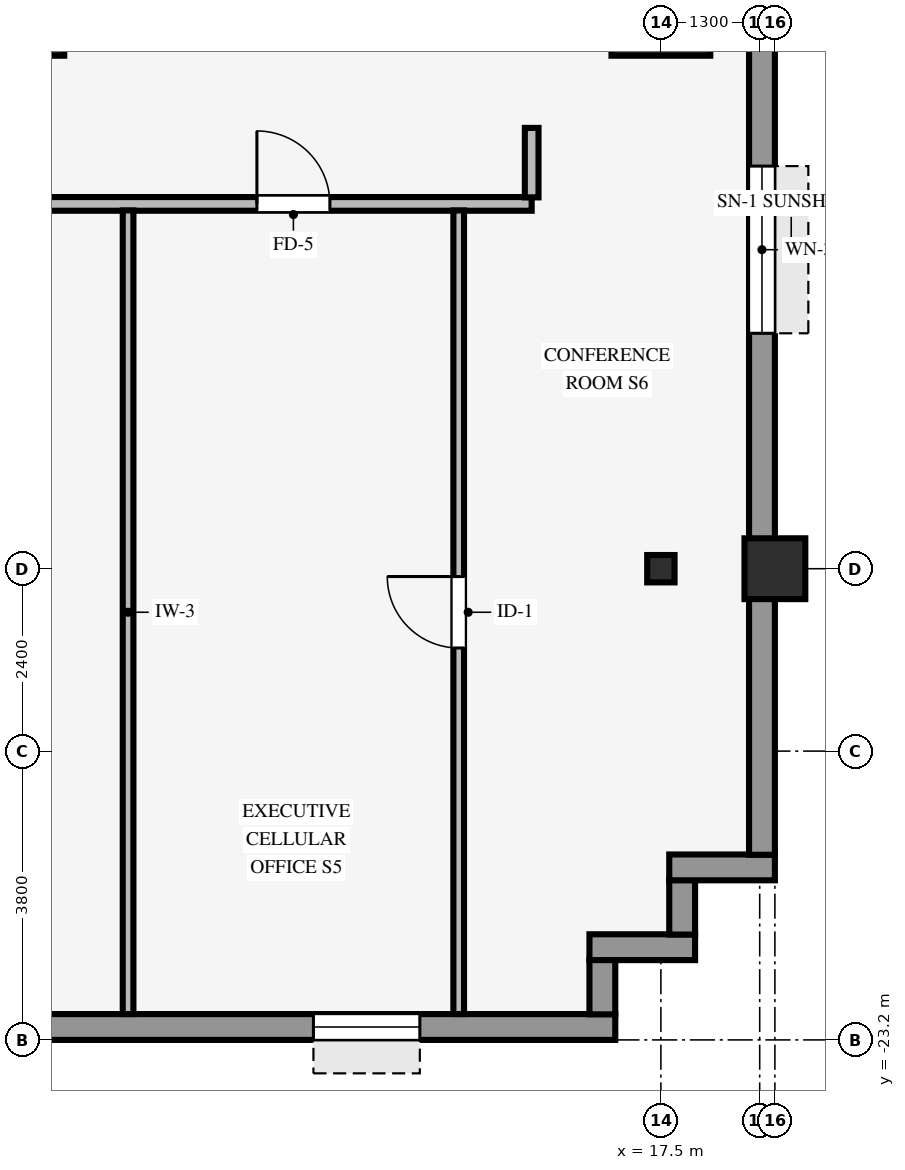
"""IFC4 building model, lengths in metres.
Left out: names, types, materials, properties, quantities, classifications, styles, units other than length and angle.
Written with IfcOpenShell. Run it as: python <this file> out.ifc"""

import sys

from ifc_helpers import new_model, si_unit, direction, frame, frame_2d, origin, origin_2d, place, context, subcontext, project, spatial, rectangle, hollow_rectangle, i_section, extrude, source, transform, mapped, element, fill, save


model = new_model("IFC4")
c1 = context("Model", 3, precision=1e-05, world=origin(), true_north=direction((0.0, 1.0)))
c2 = subcontext(c1, "Body", "Model", "MODEL_VIEW")
j1 = project(units=[si_unit("LENGTHUNIT", "METRE"), si_unit("PLANEANGLEUNIT", "RADIAN")], contexts=[c1])
p1 = place(None, origin())
s1 = spatial("IfcSite", under=j1, at=p1, CompositionType="ELEMENT")
p2 = place(p1, origin())
s2 = spatial("IfcBuilding", under=s1, at=p2, CompositionType="ELEMENT")
p3 = place(p2, frame((0.0, 0.0, 53.15)))
s3 = spatial("IfcBuildingStorey", under=s2, at=p3, CompositionType="ELEMENT", Elevation=53.15)
for number, where, z_axis, x_axis in (
    (1, (9.0, -9.6, 0.0), (0.0, 0.0, 1.0), (1.0, 0.0, 0.0)),
    (2, (17.5, -9.6, 0.0), (0.0, 0.0, 1.0), (1.0, 0.0, 0.0)),
):
    element("IfcColumn", number, at=place(p3, frame(where, z_axis=z_axis, x_axis=x_axis)), inside=s3, PredefinedType="COLUMN", context=c2, shape_type="SweptSolid", body=[
        extrude(rectangle(XDim=1.3, YDim=1.3, at=origin_2d()), origin(), (0.0, 0.0, 1.0), 3.25),
    ])
p4 = place(p3, frame((19.0, -17.0, 0.0), z_axis=(0.0, 0.0, 1.0), x_axis=(1.0, 0.0, 0.0)))
e3 = element("IfcColumn", 3, at=p4, inside=s3, PredefinedType="COLUMN", context=c2, shape_type="SweptSolid", body=[
    extrude(hollow_rectangle(XDim=0.8, YDim=0.8, WallThickness=0.055, InnerFilletRadius=0.055, OuterFilletRadius=0.11, at=origin_2d()), origin(), (0.0, 0.0, 1.0), 3.25),
])
p5 = place(p3, frame((17.5, -17.0, 0.0), z_axis=(0.0, 0.0, 1.0), x_axis=(1.0, 0.0, 0.0)))
e4 = element("IfcColumn", 4, at=p5, inside=s3, PredefinedType="COLUMN", context=c2, shape_type="SweptSolid", body=[
    extrude(i_section(OverallWidth=0.36, OverallDepth=0.36, WebThickness=0.021, FlangeThickness=0.021, FilletRadius=0.018, at=origin_2d()), origin(), (0.0, 0.0, 1.0), 3.25),
])
p6 = place(p3, frame((-16.9, -23.03, 0.0), z_axis=(0.0, 0.0, 1.0), x_axis=(1.0, 0.0, 0.0)))
e5 = element("IfcWall", 5, at=p6, inside=s3, PredefinedType="STANDARD", context=c2, shape_type="SweptSolid", body=[
    extrude(rectangle(XDim=33.8, YDim=0.34, at=frame_2d((16.9, 0.0))), origin(), (0.0, 0.0, 1.0), 2.585),
])
p7 = place(p6, frame((2.121, 0.0, 0.8)))
e6 = element("IfcOpeningElement", 6, at=p7, cuts=e5, PredefinedType="OPENING", context=c2, shape_type="SweptSolid", body=[
    extrude(rectangle(XDim=1.4, YDim=1.65, at=frame_2d((0.7, 0.825))), frame((0.0, 0.18, 0.0), z_axis=(0.0, -1.0, 0.0), x_axis=(1.0, 0.0, 0.0)), (0.0, 0.0, 1.0), 0.36),
])
p8 = place(p6, frame((5.764, 0.0, 0.8)))
e7 = element("IfcOpeningElement", 7, at=p8, cuts=e5, PredefinedType="OPENING", context=c2, shape_type="SweptSolid", body=[
    extrude(rectangle(XDim=1.4, YDim=1.65, at=frame_2d((0.7, 0.825))), frame((0.0, 0.18, 0.0), z_axis=(0.0, -1.0, 0.0), x_axis=(1.0, 0.0, 0.0)), (0.0, 0.0, 1.0), 0.36),
])
p9 = place(p6, frame((11.657, 0.0, 0.8)))
e8 = element("IfcOpeningElement", 8, at=p9, cuts=e5, PredefinedType="OPENING", context=c2, shape_type="SweptSolid", body=[
    extrude(rectangle(XDim=1.4, YDim=1.65, at=frame_2d((0.7, 0.825))), frame((0.0, 0.18, 0.0), z_axis=(0.0, -1.0, 0.0), x_axis=(1.0, 0.0, 0.0)), (0.0, 0.0, 1.0), 0.36),
])
p10 = place(p6, frame((20.743, 0.0, 0.8)))
e9 = element("IfcOpeningElement", 9, at=p10, cuts=e5, PredefinedType="OPENING", context=c2, shape_type="SweptSolid", body=[
    extrude(rectangle(XDim=1.4, YDim=1.65, at=frame_2d((0.7, 0.825))), frame((0.0, 0.18, 0.0), z_axis=(0.0, -1.0, 0.0), x_axis=(1.0, 0.0, 0.0)), (0.0, 0.0, 1.0), 0.36),
])
p11 = place(p6, frame((29.829, 0.0, 0.8)))
e10 = element("IfcOpeningElement", 10, at=p11, cuts=e5, PredefinedType="OPENING", context=c2, shape_type="SweptSolid", body=[
    extrude(rectangle(XDim=1.4, YDim=1.65, at=frame_2d((0.7, 0.825))), frame((0.0, 0.18, 0.0), z_axis=(0.0, -1.0, 0.0), x_axis=(1.0, 0.0, 0.0)), (0.0, 0.0, 1.0), 0.36),
])
p12 = place(p3, frame((16.73, -22.864, 0.0), z_axis=(0.0, 0.0, 1.0), x_axis=(0.0, 1.0, 0.0)))
e11 = element("IfcWall", 11, at=p12, inside=s3, PredefinedType="STANDARD", context=c2, shape_type="SweptSolid", body=[
    extrude(rectangle(XDim=0.718, YDim=0.34, at=frame_2d((0.359, 0.0))), origin(), (0.0, 0.0, 1.0), 3.24),
])
p13 = place(p3, frame((16.56, -21.98, 0.0), z_axis=(0.0, 0.0, 1.0), x_axis=(1.0, 0.0, 0.0)))
e12 = element("IfcWall", 12, at=p13, inside=s3, PredefinedType="STANDARD", context=c2, shape_type="SweptSolid", body=[
    extrude(rectangle(XDim=1.39, YDim=0.34, at=frame_2d((0.695, 0.0))), origin(), (0.0, 0.0, 1.0), 3.24),
])
p14 = place(p3, frame((17.78, -21.814, 0.0), z_axis=(0.0, 0.0, 1.0), x_axis=(0.0, 1.0, 0.0)))
e13 = element("IfcWall", 13, at=p14, inside=s3, PredefinedType="STANDARD", context=c2, shape_type="SweptSolid", body=[
    extrude(rectangle(XDim=0.718, YDim=0.34, at=frame_2d((0.359, 0.0))), origin(), (0.0, 0.0, 1.0), 3.24),
])
p15 = place(p3, frame((17.61, -20.93, 0.0), z_axis=(0.0, 0.0, 1.0), x_axis=(1.0, 0.0, 0.0)))
e14 = element("IfcWall", 14, at=p15, inside=s3, PredefinedType="STANDARD", context=c2, shape_type="SweptSolid", body=[
    extrude(rectangle(XDim=1.39, YDim=0.34, at=frame_2d((0.695, 0.0))), origin(), (0.0, 0.0, 1.0), 3.24),
])
p16 = place(p3, frame((18.83, -20.764, 0.0), z_axis=(0.0, 0.0, 1.0), x_axis=(0.0, 1.0, 0.0)))
e15 = element("IfcWall", 15, at=p16, inside=s3, PredefinedType="STANDARD", context=c2, shape_type="SweptSolid", body=[
    extrude(rectangle(XDim=41.528, YDim=0.34, at=frame_2d((20.764, 0.0))), origin(), (0.0, 0.0, 1.0), 3.24),
])
p17 = place(p16, frame((6.862, 0.0, 0.8)))
e16 = element("IfcOpeningElement", 16, at=p17, cuts=e15, PredefinedType="OPENING", context=c2, shape_type="SweptSolid", body=[
    extrude(rectangle(XDim=2.2, YDim=1.65, at=frame_2d((1.1, 0.825))), frame((0.0, 0.18, 0.0), z_axis=(0.0, -1.0, 0.0), x_axis=(1.0, 0.0, 0.0)), (0.0, 0.0, 1.0), 0.36),
])
p18 = place(p16, frame((32.467, 0.0, 0.8)))
e17 = element("IfcOpeningElement", 17, at=p18, cuts=e15, PredefinedType="OPENING", context=c2, shape_type="SweptSolid", body=[
    extrude(rectangle(XDim=2.2, YDim=1.65, at=frame_2d((1.1, 0.825))), frame((0.0, 0.18, 0.0), z_axis=(0.0, -1.0, 0.0), x_axis=(1.0, 0.0, 0.0)), (0.0, 0.0, 1.0), 0.36),
])
p19 = place(p3, frame((-15.8, -12.2, 0.0), z_axis=(0.0, 0.0, 1.0), x_axis=(1.0, 0.0, 0.0)))
e18 = element("IfcWall", 18, at=p19, inside=s3, PredefinedType="PARTITIONING", context=c2, shape_type="SweptSolid", body=[
    extrude(rectangle(XDim=31.6, YDim=0.18, at=frame_2d((15.8, 0.0))), origin(), (0.0, 0.0, 1.0), 3.24),
])
p20 = place(p19, frame((18.085, 0.0, 0.0)))
e19 = element("IfcOpeningElement", 19, at=p20, cuts=e18, PredefinedType="OPENING", context=c2, shape_type="SweptSolid", body=[
    extrude(rectangle(XDim=0.96, YDim=2.1, at=frame_2d((0.48, 1.05))), frame((0.0, 0.1, 0.0), z_axis=(0.0, -1.0, 0.0), x_axis=(1.0, 0.0, 0.0)), (0.0, 0.0, 1.0), 0.2),
])
p21 = place(p19, frame((27.985, 0.0, 0.0)))
e20 = element("IfcOpeningElement", 20, at=p21, cuts=e18, PredefinedType="OPENING", context=c2, shape_type="SweptSolid", body=[
    extrude(rectangle(XDim=0.96, YDim=2.1, at=frame_2d((0.48, 1.05))), frame((0.0, 0.1, 0.0), z_axis=(0.0, -1.0, 0.0), x_axis=(1.0, 0.0, 0.0)), (0.0, 0.0, 1.0), 0.2),
])
p22 = place(p19, frame((23.73, 0.0, 0.0)))
e21 = element("IfcOpeningElement", 21, at=p22, cuts=e18, PredefinedType="OPENING", context=c2, shape_type="SweptSolid", body=[
    extrude(rectangle(XDim=0.96, YDim=2.1, at=frame_2d((0.48, 1.05))), frame((0.0, 0.1, 0.0), z_axis=(0.0, -1.0, 0.0), x_axis=(1.0, 0.0, 0.0)), (0.0, 0.0, 1.0), 0.2),
])
p23 = place(p19, frame((0.92, 0.0, 0.0)))
e22 = element("IfcOpeningElement", 22, at=p23, cuts=e18, PredefinedType="OPENING", context=c2, shape_type="SweptSolid", body=[
    extrude(rectangle(XDim=0.96, YDim=2.1, at=frame_2d((0.48, 1.05))), frame((0.0, 0.1, 0.0), z_axis=(0.0, -1.0, 0.0), x_axis=(1.0, 0.0, 0.0)), (0.0, 0.0, 1.0), 0.2),
])
p24 = place(p19, frame((6.25, 0.0, 0.0)))
e23 = element("IfcOpeningElement", 23, at=p24, cuts=e18, PredefinedType="OPENING", context=c2, shape_type="SweptSolid", body=[
    extrude(rectangle(XDim=0.9, YDim=2.1, at=frame_2d((0.45, 1.05))), frame((0.0, 0.1, 0.0), z_axis=(0.0, -1.0, 0.0), x_axis=(1.0, 0.0, 0.0)), (0.0, 0.0, 1.0), 0.2),
])
p25 = place(p19, frame((3.65, 0.0, 0.0)))
e24 = element("IfcOpeningElement", 24, at=p25, cuts=e18, PredefinedType="OPENING", context=c2, shape_type="SweptSolid", body=[
    extrude(rectangle(XDim=0.9, YDim=2.1, at=frame_2d((0.45, 1.05))), frame((0.0, 0.1, 0.0), z_axis=(0.0, -1.0, 0.0), x_axis=(1.0, 0.0, 0.0)), (0.0, 0.0, 1.0), 0.2),
])
p26 = place(p19, frame((13.32, 0.0, 0.0)))
e25 = element("IfcOpeningElement", 25, at=p26, cuts=e18, PredefinedType="OPENING", context=c2, shape_type="SweptSolid", body=[
    extrude(rectangle(XDim=0.96, YDim=2.1, at=frame_2d((0.48, 1.05))), frame((0.0, 0.1, 0.0), z_axis=(0.0, -1.0, 0.0), x_axis=(1.0, 0.0, 0.0)), (0.0, 0.0, 1.0), 0.2),
])
p27 = place(p19, frame((8.75, 0.0, 0.0)))
e26 = element("IfcOpeningElement", 26, at=p27, cuts=e18, PredefinedType="OPENING", context=c2, shape_type="SweptSolid", body=[
    extrude(rectangle(XDim=0.9, YDim=2.1, at=frame_2d((0.45, 1.05))), frame((0.0, 0.1, 0.0), z_axis=(0.0, -1.0, 0.0), x_axis=(1.0, 0.0, 0.0)), (0.0, 0.0, 1.0), 0.2),
])
p28 = place(p3, frame((10.49, -22.86, 0.0), z_axis=(0.0, 0.0, 1.0), x_axis=(0.0, 1.0, 0.0)))
e27 = element("IfcWall", 27, at=p28, inside=s3, PredefinedType="PARTITIONING", context=c2, shape_type="SweptSolid", body=[
    extrude(rectangle(XDim=10.574, YDim=0.14, at=frame_2d((5.287, 0.0))), origin(), (0.0, 0.0, 1.0), 3.24),
])
p29 = place(p3, frame((14.84, -22.86, 0.0), z_axis=(0.0, 0.0, 1.0), x_axis=(0.0, 1.0, 0.0)))
e28 = element("IfcWall", 28, at=p29, inside=s3, PredefinedType="PARTITIONING", context=c2, shape_type="SweptSolid", body=[
    extrude(rectangle(XDim=10.574, YDim=0.14, at=frame_2d((5.287, 0.0))), origin(), (0.0, 0.0, 1.0), 3.24),
])
p30 = place(p29, frame((4.817, 0.0, 0.0)))
e29 = element("IfcOpeningElement", 29, at=p30, cuts=e28, PredefinedType="OPENING", context=c2, shape_type="SweptSolid", body=[
    extrude(rectangle(XDim=0.94, YDim=2.1, at=frame_2d((0.47, 1.05))), frame((0.0, 0.08, 0.0), z_axis=(0.0, -1.0, 0.0), x_axis=(1.0, 0.0, 0.0)), (0.0, 0.0, 1.0), 0.16),
])
p31 = place(p3, frame((15.8, -12.114, 0.0), z_axis=(0.0, 0.0, 1.0), x_axis=(0.0, 1.0, 0.0)))
e30 = element("IfcWall", 30, at=p31, inside=s3, PredefinedType="PARTITIONING", context=c2, shape_type="SweptSolid", body=[
    extrude(rectangle(XDim=0.914, YDim=0.18, at=frame_2d((0.457, 0.0))), origin(), (0.0, 0.0, 1.0), 3.24),
])
m1 = source(origin(), c2, "Body", "SweptSolid", [
    extrude(rectangle(XDim=1.4, YDim=1.65, at=frame_2d((0.7, 0.825))), frame((0.0, 0.03, 0.0), z_axis=(0.0, -1.0, 0.0), x_axis=(1.0, 0.0, 0.0)), (0.0, 0.0, 1.0), 0.06),
])
p32 = place(p11, origin())
e31 = element("IfcWindow", 31, at=p32, inside=s3, PartitioningType="SINGLE_PANEL", PredefinedType="WINDOW", context=c2, shape_type="MappedRepresentation", body=[
    mapped(m1, transform((0.0, 0.0, 0.0), scale=1.0)),
])
fill(e10, e31)
m2 = source(origin(), c2, "Body", "SweptSolid", [
    extrude(rectangle(XDim=2.2, YDim=1.65, at=frame_2d((1.1, 0.825))), frame((0.0, 0.03, 0.0), z_axis=(0.0, -1.0, 0.0), x_axis=(1.0, 0.0, 0.0)), (0.0, 0.0, 1.0), 0.06),
])
p33 = place(p17, origin())
e32 = element("IfcWindow", 32, at=p33, inside=s3, PartitioningType="SINGLE_PANEL", PredefinedType="WINDOW", context=c2, shape_type="MappedRepresentation", body=[
    mapped(m2, transform((0.0, 0.0, 0.0), scale=1.0)),
])
fill(e16, e32)
m3 = source(origin(), c2, "Body", "SweptSolid", [
    extrude(rectangle(XDim=0.96, YDim=2.1, at=frame_2d((0.48, 1.05))), frame((0.0, 0.025, 0.0), z_axis=(0.0, -1.0, 0.0), x_axis=(1.0, 0.0, 0.0)), (0.0, 0.0, 1.0), 0.05),
])
p34 = place(p21, origin())
e33 = element("IfcDoor", 33, at=p34, inside=s3, OperationType="SINGLE_SWING_LEFT", PredefinedType="DOOR", context=c2, shape_type="MappedRepresentation", body=[
    mapped(m3, transform((0.0, 0.0, 0.0), scale=1.0)),
])
fill(e20, e33)
m4 = source(origin(), c2, "Body", "SweptSolid", [
    extrude(rectangle(XDim=0.94, YDim=2.1, at=frame_2d((0.47, 1.05))), frame((0.0, 0.025, 0.0), z_axis=(0.0, -1.0, 0.0), x_axis=(1.0, 0.0, 0.0)), (0.0, 0.0, 1.0), 0.05),
])
p35 = place(p30, origin())
e34 = element("IfcDoor", 34, at=p35, inside=s3, OperationType="SINGLE_SWING_RIGHT", PredefinedType="DOOR", context=c2, shape_type="MappedRepresentation", body=[
    mapped(m4, transform((0.0, 0.0, 0.0), scale=1.0)),
])
fill(e29, e34)
save(model, sys.argv[1])
